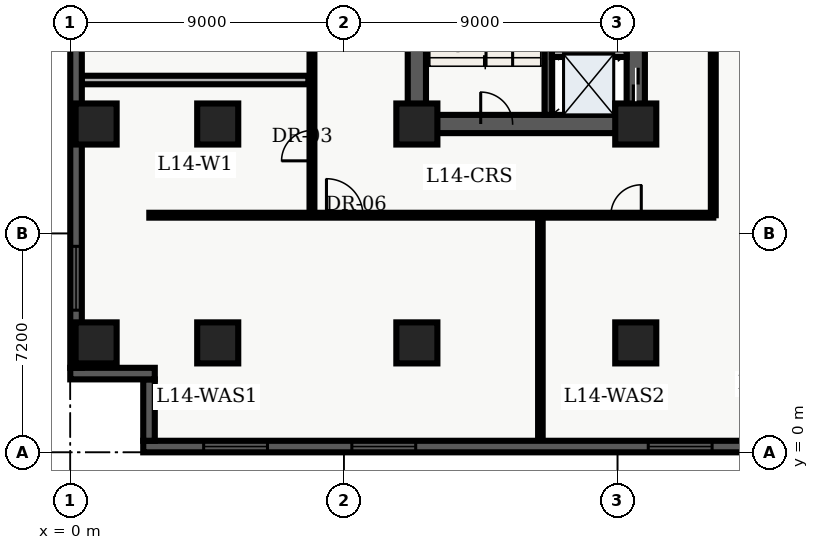
"""IFC4 building model, lengths in metres.
Left out: names, types, materials, properties, quantities, classifications, styles, units other than length and angle.
Written with IfcOpenShell. Run it as: python <this file> out.ifc"""

import sys

from ifc_helpers import new_model, entity, si_unit, converted_unit, direction, frame, origin_with_axes, origin_2d_with_axis, place, context, subcontext, project, spatial, polyline, rectangle, outline, extrude, element, fill, save


model = new_model("IFC4")
c1 = context("Model", 3, precision=1e-05, world=origin_with_axes(), true_north=direction((0.0, 1.0)))
c2 = subcontext(c1, "Body", "Model", "MODEL_VIEW")
j1 = project(units=[si_unit("LENGTHUNIT", "METRE"), converted_unit("PLANEANGLEUNIT", "DEGREE", entity("IfcPlaneAngleMeasure", 0.017), si_unit("PLANEANGLEUNIT", "RADIAN"), dimensions=[0, 0, 0, 0, 0, 0, 0])], contexts=[c1])
p1 = place(None, origin_with_axes())
s1 = spatial("IfcSite", under=j1, at=p1, CompositionType="ELEMENT")
p2 = place(p1, origin_with_axes())
s2 = spatial("IfcBuilding", under=s1, at=p2, CompositionType="ELEMENT")
p3 = place(p2, frame((0.0, 0.0, 60.0), z_axis=(0.0, 0.0, 1.0), x_axis=(1.0, 0.0, 0.0)))
s3 = spatial("IfcBuildingStorey", under=s2, at=p3, CompositionType="ELEMENT", Elevation=60.0)
p4 = place(p3, frame((11.4, 10.8, 0.0), z_axis=(0.0, 0.0, 1.0), x_axis=(0.0, 1.0, 0.0)))
e1 = element("IfcWall", 1, at=p4, inside=s3, PredefinedType="SHEAR", context=c2, shape_type="SweptSolid", body=[
    extrude(outline(polyline([(0.0, -0.3), (27.0, -0.3), (27.0, 0.3), (0.0, 0.3), (0.0, -0.3)])), origin_with_axes(), (0.0, 0.0, 1.0), 3.66),
])
p5 = place(p3, frame((11.4, 10.8, 0.0), z_axis=(0.0, 0.0, 1.0), x_axis=(1.0, 0.0, 0.0)))
e2 = element("IfcWall", 2, at=p5, inside=s3, PredefinedType="SHEAR", context=c2, shape_type="SweptSolid", body=[
    extrude(outline(polyline([(0.0, -0.3), (7.2, -0.3), (7.2, 0.3), (0.0, 0.3), (0.0, -0.3)])), origin_with_axes(), (0.0, 0.0, 1.0), 3.66),
])
p6 = place(p5, frame((2.625, 0.0, 0.0), z_axis=(0.0, 0.0, 1.0), x_axis=(1.0, 0.0, 0.0)))
e3 = element("IfcOpeningElement", 3, at=p6, cuts=e2, PredefinedType="OPENING", context=c2, shape_type="SweptSolid", body=[
    extrude(rectangle(XDim=1.05, YDim=0.62, at=origin_2d_with_axis()), origin_with_axes(), (0.0, 0.0, 1.0), 2.15),
])
p7 = place(p3, frame((18.6, 10.8, 0.0), z_axis=(0.0, 0.0, 1.0), x_axis=(0.0, 1.0, 0.0)))
e4 = element("IfcWall", 4, at=p7, inside=s3, PredefinedType="SHEAR", context=c2, shape_type="SweptSolid", body=[
    extrude(outline(polyline([(0.0, -0.3), (13.5, -0.3), (13.5, 0.3), (0.0, 0.3), (0.0, -0.3)])), origin_with_axes(), (0.0, 0.0, 1.0), 3.66),
])
p8 = place(p7, frame((1.3, 0.0, 0.0), z_axis=(0.0, 0.0, 1.0), x_axis=(1.0, 0.0, 0.0)))
e5 = element("IfcOpeningElement", 5, at=p8, cuts=e4, PredefinedType="OPENING", context=c2, shape_type="SweptSolid", body=[
    extrude(rectangle(XDim=1.1, YDim=0.62, at=origin_2d_with_axis()), origin_with_axes(), (0.0, 0.0, 1.0), 2.15),
])
p9 = place(p7, frame((3.4, 0.0, 0.0), z_axis=(0.0, 0.0, 1.0), x_axis=(1.0, 0.0, 0.0)))
e6 = element("IfcOpeningElement", 6, at=p9, cuts=e4, PredefinedType="OPENING", context=c2, shape_type="SweptSolid", body=[
    extrude(rectangle(XDim=1.1, YDim=0.62, at=origin_2d_with_axis()), origin_with_axes(), (0.0, 0.0, 1.0), 2.15),
])
p10 = place(p7, frame((11.125, 0.0, 0.0), z_axis=(0.0, 0.0, 1.0), x_axis=(1.0, 0.0, 0.0)))
e7 = element("IfcOpeningElement", 7, at=p10, cuts=e4, PredefinedType="OPENING", context=c2, shape_type="SweptSolid", body=[
    extrude(rectangle(XDim=1.05, YDim=0.62, at=origin_2d_with_axis()), origin_with_axes(), (0.0, 0.0, 1.0), 2.15),
])
p11 = place(p3, frame((15.725, 11.1, 0.0), z_axis=(0.0, 0.0, 1.0), x_axis=(0.0, 1.0, 0.0)))
e8 = element("IfcWall", 8, at=p11, inside=s3, PredefinedType="SHEAR", context=c2, shape_type="SweptSolid", body=[
    extrude(outline(polyline([(0.0, -0.125), (8.6, -0.125), (8.6, 0.125), (0.0, 0.125), (0.0, -0.125)])), origin_with_axes(), (0.0, 0.0, 1.0), 3.66),
])
for number, where, z_axis, x_axis in (
    (9, (11.4, 3.6, 0.0), (0.0, 0.0, 1.0), (1.0, 0.0, 0.0)),
    (10, (11.4, 10.8, 0.0), (0.0, 0.0, 1.0), (1.0, 0.0, 0.0)),
    (11, (18.6, 3.6, 0.0), (0.0, 0.0, 1.0), (1.0, 0.0, 0.0)),
    (12, (18.6, 10.8, 0.0), (0.0, 0.0, 1.0), (1.0, 0.0, 0.0)),
    (13, (4.85, 3.6, 0.0), (0.0, 0.0, 1.0), (1.0, 0.0, 0.0)),
    (14, (4.85, 10.8, 0.0), (0.0, 0.0, 1.0), (1.0, 0.0, 0.0)),
    (15, (0.85, 3.6, 0.0), (0.0, 0.0, 1.0), (1.0, 0.0, 0.0)),
    (16, (0.85, 10.8, 0.0), (0.0, 0.0, 1.0), (1.0, 0.0, 0.0)),
):
    element("IfcColumn", number, at=place(p3, frame(where, z_axis=z_axis, x_axis=x_axis)), inside=s3, PredefinedType="COLUMN", context=c2, shape_type="SweptSolid", body=[
        extrude(rectangle(XDim=1.35, YDim=1.35, at=origin_2d_with_axis()), origin_with_axes(), (0.0, 0.0, 1.0), 3.9),
    ])
p12 = place(p3, frame((15.84, 13.13, 0.0), z_axis=(0.0, 0.0, 1.0), x_axis=(1.0, 0.0, 0.0)))
e17 = element("IfcWall", 17, at=p12, inside=s3, PredefinedType="SOLIDWALL", context=c2, shape_type="SweptSolid", body=[
    extrude(outline(polyline([(0.0, -0.125), (2.46, -0.125), (2.46, 0.125), (0.0, 0.125), (0.0, -0.125)])), origin_with_axes(), (0.0, 0.0, 1.0), 2.7),
])
p13 = place(p3, frame((2.6, 7.8, 0.0), z_axis=(0.0, 0.0, 1.0), x_axis=(1.0, 0.0, 0.0)))
e18 = element("IfcWall", 18, at=p13, inside=s3, PredefinedType="PARTITIONING", context=c2, shape_type="SweptSolid", body=[
    extrude(outline(polyline([(0.0, -0.08), (18.55, -0.08), (18.55, 0.08), (0.0, 0.08), (0.0, -0.08)])), origin_with_axes(), (0.0, 0.0, 1.0), 2.7),
])
p14 = place(p13, frame((6.426, 0.0, 0.0), z_axis=(0.0, 0.0, 1.0), x_axis=(1.0, 0.0, 0.0)))
e19 = element("IfcOpeningElement", 19, at=p14, cuts=e18, PredefinedType="OPENING", context=c2, shape_type="SweptSolid", body=[
    extrude(rectangle(XDim=1.2, YDim=0.18, at=origin_2d_with_axis()), origin_with_axes(), (0.0, 0.0, 1.0), 2.2),
])
p15 = place(p13, frame((15.681, 0.0, 0.0), z_axis=(0.0, 0.0, 1.0), x_axis=(1.0, 0.0, 0.0)))
e20 = element("IfcOpeningElement", 20, at=p15, cuts=e18, PredefinedType="OPENING", context=c2, shape_type="SweptSolid", body=[
    extrude(rectangle(XDim=1.0, YDim=0.18, at=origin_2d_with_axis()), origin_with_axes(), (0.0, 0.0, 1.0), 2.15),
])
p16 = place(p3, frame((21.15, 7.8, 0.0), z_axis=(0.0, 0.0, 1.0), x_axis=(0.0, 1.0, 0.0)))
e21 = element("IfcWall", 21, at=p16, inside=s3, PredefinedType="PARTITIONING", context=c2, shape_type="SweptSolid", body=[
    extrude(outline(polyline([(0.0, -0.08), (32.7, -0.08), (32.7, 0.08), (0.0, 0.08), (0.0, -0.08)])), origin_with_axes(), (0.0, 0.0, 1.0), 2.7),
])
p17 = place(p16, frame((6.675, 0.0, 0.0), z_axis=(0.0, 0.0, 1.0), x_axis=(1.0, 0.0, 0.0)))
e22 = element("IfcOpeningElement", 22, at=p17, cuts=e21, PredefinedType="OPENING", context=c2, shape_type="SweptSolid", body=[
    extrude(rectangle(XDim=1.05, YDim=0.18, at=origin_2d_with_axis()), origin_with_axes(), (0.0, 0.0, 1.0), 2.15),
])
p18 = place(p3, frame((7.95, 7.8, 0.0), z_axis=(0.0, 0.0, 1.0), x_axis=(0.0, 1.0, 0.0)))
e23 = element("IfcWall", 23, at=p18, inside=s3, PredefinedType="PARTITIONING", context=c2, shape_type="SweptSolid", body=[
    extrude(outline(polyline([(0.0, -0.08), (32.7, -0.08), (32.7, 0.08), (0.0, 0.08), (0.0, -0.08)])), origin_with_axes(), (0.0, 0.0, 1.0), 2.7),
])
p19 = place(p18, frame((2.288, 0.0, 0.0), z_axis=(0.0, 0.0, 1.0), x_axis=(1.0, 0.0, 0.0)))
e24 = element("IfcOpeningElement", 24, at=p19, cuts=e23, PredefinedType="OPENING", context=c2, shape_type="SweptSolid", body=[
    extrude(rectangle(XDim=1.0, YDim=0.18, at=origin_2d_with_axis()), origin_with_axes(), (0.0, 0.0, 1.0), 2.15),
])
p20 = place(p18, frame((6.971, 0.0, 0.0), z_axis=(0.0, 0.0, 1.0), x_axis=(1.0, 0.0, 0.0)))
e25 = element("IfcOpeningElement", 25, at=p20, cuts=e23, PredefinedType="OPENING", context=c2, shape_type="SweptSolid", body=[
    extrude(rectangle(XDim=1.0, YDim=0.18, at=origin_2d_with_axis()), origin_with_axes(), (0.0, 0.0, 1.0), 2.15),
])
p21 = place(p18, frame((12.598, 0.0, 0.0), z_axis=(0.0, 0.0, 1.0), x_axis=(1.0, 0.0, 0.0)))
e26 = element("IfcOpeningElement", 26, at=p21, cuts=e23, PredefinedType="OPENING", context=c2, shape_type="SweptSolid", body=[
    extrude(rectangle(XDim=1.0, YDim=0.18, at=origin_2d_with_axis()), origin_with_axes(), (0.0, 0.0, 1.0), 2.15),
])
p22 = place(p18, frame((19.386, 0.0, 0.0), z_axis=(0.0, 0.0, 1.0), x_axis=(1.0, 0.0, 0.0)))
e27 = element("IfcOpeningElement", 27, at=p22, cuts=e23, PredefinedType="OPENING", context=c2, shape_type="SweptSolid", body=[
    extrude(rectangle(XDim=1.0, YDim=0.18, at=origin_2d_with_axis()), origin_with_axes(), (0.0, 0.0, 1.0), 2.15),
])
p23 = place(p18, frame((27.82, 0.0, 0.0), z_axis=(0.0, 0.0, 1.0), x_axis=(1.0, 0.0, 0.0)))
e28 = element("IfcOpeningElement", 28, at=p23, cuts=e23, PredefinedType="OPENING", context=c2, shape_type="SweptSolid", body=[
    extrude(rectangle(XDim=1.0, YDim=0.18, at=origin_2d_with_axis()), origin_with_axes(), (0.0, 0.0, 1.0), 2.15),
])
p24 = place(p3, frame((0.375, 12.247, 0.0), z_axis=(0.0, 0.0, 1.0), x_axis=(1.0, 0.0, 0.0)))
e29 = element("IfcWall", 29, at=p24, inside=s3, PredefinedType="PARTITIONING", context=c2, shape_type="SweptSolid", body=[
    extrude(outline(polyline([(0.0, -0.14), (7.455, -0.14), (7.455, 0.14), (0.0, 0.14), (0.0, -0.14)])), origin_with_axes(), (0.0, 0.0, 1.0), 2.7),
])
p25 = place(p3, frame((15.463, 0.36, 0.0), z_axis=(0.0, 0.0, 1.0), x_axis=(0.0, 1.0, 0.0)))
e30 = element("IfcWall", 30, at=p25, inside=s3, PredefinedType="PARTITIONING", context=c2, shape_type="SweptSolid", body=[
    extrude(outline(polyline([(0.0, -0.075), (7.34, -0.075), (7.34, 0.075), (0.0, 0.075), (0.0, -0.075)])), origin_with_axes(), (0.0, 0.0, 1.0), 2.7),
])
p26 = place(p3, frame((57.22, 0.19, 0.0), z_axis=(0.0, 0.0, 1.0), x_axis=(-1.0, 0.0, 0.0)))
e31 = element("IfcWall", 31, at=p26, inside=s3, PredefinedType="SOLIDWALL", context=c2, shape_type="SweptSolid", body=[
    extrude(outline(polyline([(0.0, -0.19), (54.82, -0.19), (54.82, 0.19), (0.0, 0.19), (0.0, -0.19)])), origin_with_axes(), (0.0, 0.0, 1.0), 3.66),
])
p27 = place(p26, frame((3.037, 0.0, 0.45), z_axis=(0.0, 0.0, 1.0), x_axis=(1.0, 0.0, 0.0)))
e32 = element("IfcOpeningElement", 32, at=p27, cuts=e31, PredefinedType="OPENING", context=c2, shape_type="SweptSolid", body=[
    extrude(rectangle(XDim=2.1, YDim=0.4, at=origin_2d_with_axis()), origin_with_axes(), (0.0, 0.0, 1.0), 2.2),
])
p28 = place(p26, frame((7.912, 0.0, 0.45), z_axis=(0.0, 0.0, 1.0), x_axis=(1.0, 0.0, 0.0)))
e33 = element("IfcOpeningElement", 33, at=p28, cuts=e31, PredefinedType="OPENING", context=c2, shape_type="SweptSolid", body=[
    extrude(rectangle(XDim=2.1, YDim=0.4, at=origin_2d_with_axis()), origin_with_axes(), (0.0, 0.0, 1.0), 2.2),
])
p29 = place(p26, frame((12.786, 0.0, 0.45), z_axis=(0.0, 0.0, 1.0), x_axis=(1.0, 0.0, 0.0)))
e34 = element("IfcOpeningElement", 34, at=p29, cuts=e31, PredefinedType="OPENING", context=c2, shape_type="SweptSolid", body=[
    extrude(rectangle(XDim=2.1, YDim=0.4, at=origin_2d_with_axis()), origin_with_axes(), (0.0, 0.0, 1.0), 2.2),
])
p30 = place(p26, frame((17.661, 0.0, 0.45), z_axis=(0.0, 0.0, 1.0), x_axis=(1.0, 0.0, 0.0)))
e35 = element("IfcOpeningElement", 35, at=p30, cuts=e31, PredefinedType="OPENING", context=c2, shape_type="SweptSolid", body=[
    extrude(rectangle(XDim=2.1, YDim=0.4, at=origin_2d_with_axis()), origin_with_axes(), (0.0, 0.0, 1.0), 2.2),
])
p31 = place(p26, frame((22.535, 0.0, 0.45), z_axis=(0.0, 0.0, 1.0), x_axis=(1.0, 0.0, 0.0)))
e36 = element("IfcOpeningElement", 36, at=p31, cuts=e31, PredefinedType="OPENING", context=c2, shape_type="SweptSolid", body=[
    extrude(rectangle(XDim=2.1, YDim=0.4, at=origin_2d_with_axis()), origin_with_axes(), (0.0, 0.0, 1.0), 2.2),
])
p32 = place(p26, frame((27.41, 0.0, 0.45), z_axis=(0.0, 0.0, 1.0), x_axis=(1.0, 0.0, 0.0)))
e37 = element("IfcOpeningElement", 37, at=p32, cuts=e31, PredefinedType="OPENING", context=c2, shape_type="SweptSolid", body=[
    extrude(rectangle(XDim=2.1, YDim=0.4, at=origin_2d_with_axis()), origin_with_axes(), (0.0, 0.0, 1.0), 2.2),
])
p33 = place(p26, frame((32.285, 0.0, 0.45), z_axis=(0.0, 0.0, 1.0), x_axis=(1.0, 0.0, 0.0)))
e38 = element("IfcOpeningElement", 38, at=p33, cuts=e31, PredefinedType="OPENING", context=c2, shape_type="SweptSolid", body=[
    extrude(rectangle(XDim=2.1, YDim=0.4, at=origin_2d_with_axis()), origin_with_axes(), (0.0, 0.0, 1.0), 2.2),
])
p34 = place(p26, frame((37.159, 0.0, 0.45), z_axis=(0.0, 0.0, 1.0), x_axis=(1.0, 0.0, 0.0)))
e39 = element("IfcOpeningElement", 39, at=p34, cuts=e31, PredefinedType="OPENING", context=c2, shape_type="SweptSolid", body=[
    extrude(rectangle(XDim=2.1, YDim=0.4, at=origin_2d_with_axis()), origin_with_axes(), (0.0, 0.0, 1.0), 2.2),
])
p35 = place(p26, frame((46.908, 0.0, 0.45), z_axis=(0.0, 0.0, 1.0), x_axis=(1.0, 0.0, 0.0)))
e40 = element("IfcOpeningElement", 40, at=p35, cuts=e31, PredefinedType="OPENING", context=c2, shape_type="SweptSolid", body=[
    extrude(rectangle(XDim=2.1, YDim=0.4, at=origin_2d_with_axis()), origin_with_axes(), (0.0, 0.0, 1.0), 2.2),
])
p36 = place(p26, frame((51.783, 0.0, 0.45), z_axis=(0.0, 0.0, 1.0), x_axis=(1.0, 0.0, 0.0)))
e41 = element("IfcOpeningElement", 41, at=p36, cuts=e31, PredefinedType="OPENING", context=c2, shape_type="SweptSolid", body=[
    extrude(rectangle(XDim=2.1, YDim=0.4, at=origin_2d_with_axis()), origin_with_axes(), (0.0, 0.0, 1.0), 2.2),
])
p37 = place(p3, frame((2.59, 0.38, 0.0), z_axis=(0.0, 0.0, 1.0), x_axis=(0.0, 1.0, 0.0)))
e42 = element("IfcWall", 42, at=p37, inside=s3, PredefinedType="SOLIDWALL", context=c2, shape_type="SweptSolid", body=[
    extrude(outline(polyline([(0.0, -0.19), (2.02, -0.19), (2.02, 0.19), (0.0, 0.19), (0.0, -0.19)])), origin_with_axes(), (0.0, 0.0, 1.0), 3.66),
])
p38 = place(p3, frame((2.78, 2.59, 0.0), z_axis=(0.0, 0.0, 1.0), x_axis=(-1.0, 0.0, 0.0)))
e43 = element("IfcWall", 43, at=p38, inside=s3, PredefinedType="SOLIDWALL", context=c2, shape_type="SweptSolid", body=[
    extrude(outline(polyline([(0.0, -0.19), (2.78, -0.19), (2.78, 0.19), (0.0, 0.19), (0.0, -0.19)])), origin_with_axes(), (0.0, 0.0, 1.0), 3.66),
])
p39 = place(p3, frame((0.19, 2.78, 0.0), z_axis=(0.0, 0.0, 1.0), x_axis=(0.0, 1.0, 0.0)))
e44 = element("IfcWall", 44, at=p39, inside=s3, PredefinedType="SOLIDWALL", context=c2, shape_type="SweptSolid", body=[
    extrude(outline(polyline([(0.0, -0.19), (43.42, -0.19), (43.42, 0.19), (0.0, 0.19), (0.0, -0.19)])), origin_with_axes(), (0.0, 0.0, 1.0), 3.66),
])
p40 = place(p39, frame((2.946, 0.0, 0.45), z_axis=(0.0, 0.0, 1.0), x_axis=(1.0, 0.0, 0.0)))
e45 = element("IfcOpeningElement", 45, at=p40, cuts=e44, PredefinedType="OPENING", context=c2, shape_type="SweptSolid", body=[
    extrude(rectangle(XDim=2.1, YDim=0.4, at=origin_2d_with_axis()), origin_with_axes(), (0.0, 0.0, 1.0), 2.2),
])
p41 = place(p39, frame((12.328, 0.0, 0.45), z_axis=(0.0, 0.0, 1.0), x_axis=(1.0, 0.0, 0.0)))
e46 = element("IfcOpeningElement", 46, at=p41, cuts=e44, PredefinedType="OPENING", context=c2, shape_type="SweptSolid", body=[
    extrude(rectangle(XDim=2.1, YDim=0.4, at=origin_2d_with_axis()), origin_with_axes(), (0.0, 0.0, 1.0), 2.2),
])
p42 = place(p39, frame((17.469, 0.0, 0.45), z_axis=(0.0, 0.0, 1.0), x_axis=(1.0, 0.0, 0.0)))
e47 = element("IfcOpeningElement", 47, at=p42, cuts=e44, PredefinedType="OPENING", context=c2, shape_type="SweptSolid", body=[
    extrude(rectangle(XDim=2.1, YDim=0.4, at=origin_2d_with_axis()), origin_with_axes(), (0.0, 0.0, 1.0), 2.2),
])
p43 = place(p39, frame((22.56, 0.0, 0.45), z_axis=(0.0, 0.0, 1.0), x_axis=(1.0, 0.0, 0.0)))
e48 = element("IfcOpeningElement", 48, at=p43, cuts=e44, PredefinedType="OPENING", context=c2, shape_type="SweptSolid", body=[
    extrude(rectangle(XDim=2.1, YDim=0.4, at=origin_2d_with_axis()), origin_with_axes(), (0.0, 0.0, 1.0), 2.2),
])
p44 = place(p39, frame((26.401, 0.0, 0.45), z_axis=(0.0, 0.0, 1.0), x_axis=(1.0, 0.0, 0.0)))
e49 = element("IfcOpeningElement", 49, at=p44, cuts=e44, PredefinedType="OPENING", context=c2, shape_type="SweptSolid", body=[
    extrude(rectangle(XDim=2.1, YDim=0.4, at=origin_2d_with_axis()), origin_with_axes(), (0.0, 0.0, 1.0), 2.2),
])
p45 = place(p39, frame((31.092, 0.0, 0.45), z_axis=(0.0, 0.0, 1.0), x_axis=(1.0, 0.0, 0.0)))
e50 = element("IfcOpeningElement", 50, at=p45, cuts=e44, PredefinedType="OPENING", context=c2, shape_type="SweptSolid", body=[
    extrude(rectangle(XDim=2.1, YDim=0.4, at=origin_2d_with_axis()), origin_with_axes(), (0.0, 0.0, 1.0), 2.2),
])
p46 = place(p39, frame((40.024, 0.0, 0.45), z_axis=(0.0, 0.0, 1.0), x_axis=(1.0, 0.0, 0.0)))
e51 = element("IfcOpeningElement", 51, at=p46, cuts=e44, PredefinedType="OPENING", context=c2, shape_type="SweptSolid", body=[
    extrude(rectangle(XDim=2.1, YDim=0.4, at=origin_2d_with_axis()), origin_with_axes(), (0.0, 0.0, 1.0), 2.2),
])
p47 = place(p7, frame((1.3, 0.0, 0.0), z_axis=(0.0, 0.0, 1.0), x_axis=(1.0, 0.0, 0.0)))
e52 = element("IfcDoor", 52, at=p47, inside=s3, OperationType="SLIDING_TO_LEFT", PredefinedType="DOOR", context=c2, shape_type="SweptSolid", body=[
    extrude(rectangle(XDim=1.1, YDim=0.09, at=origin_2d_with_axis()), origin_with_axes(), (0.0, 0.0, 1.0), 2.15),
])
fill(e5, e52)
p48 = place(p5, frame((2.625, 0.0, 0.0), z_axis=(0.0, 0.0, 1.0), x_axis=(1.0, 0.0, 0.0)))
e53 = element("IfcDoor", 53, at=p48, inside=s3, OperationType="SINGLE_SWING_LEFT", PredefinedType="DOOR", context=c2, shape_type="SweptSolid", body=[
    extrude(rectangle(XDim=1.05, YDim=0.09, at=origin_2d_with_axis()), origin_with_axes(), (0.0, 0.0, 1.0), 2.15),
])
fill(e3, e53)
p49 = place(p18, frame((2.288, 0.0, 0.0), z_axis=(0.0, 0.0, 1.0), x_axis=(1.0, 0.0, 0.0)))
e54 = element("IfcDoor", 54, at=p49, inside=s3, OperationType="SINGLE_SWING_LEFT", PredefinedType="DOOR", context=c2, shape_type="SweptSolid", body=[
    extrude(rectangle(XDim=1.0, YDim=0.09, at=origin_2d_with_axis()), origin_with_axes(), (0.0, 0.0, 1.0), 2.15),
])
fill(e24, e54)
p50 = place(p13, frame((6.426, 0.0, 0.0), z_axis=(0.0, 0.0, 1.0), x_axis=(1.0, 0.0, 0.0)))
e55 = element("IfcDoor", 55, at=p50, inside=s3, OperationType="SINGLE_SWING_LEFT", PredefinedType="DOOR", context=c2, shape_type="SweptSolid", body=[
    extrude(rectangle(XDim=1.2, YDim=0.09, at=origin_2d_with_axis()), origin_with_axes(), (0.0, 0.0, 1.0), 2.2),
])
fill(e19, e55)
p51 = place(p13, frame((15.681, 0.0, 0.0), z_axis=(0.0, 0.0, 1.0), x_axis=(1.0, 0.0, 0.0)))
e56 = element("IfcDoor", 56, at=p51, inside=s3, OperationType="SINGLE_SWING_RIGHT", PredefinedType="DOOR", context=c2, shape_type="SweptSolid", body=[
    extrude(rectangle(XDim=1.0, YDim=0.09, at=origin_2d_with_axis()), origin_with_axes(), (0.0, 0.0, 1.0), 2.15),
])
fill(e20, e56)
p52 = place(p26, frame((37.159, 0.0, 0.45), z_axis=(0.0, 0.0, 1.0), x_axis=(1.0, 0.0, 0.0)))
e57 = element("IfcWindow", 57, at=p52, inside=s3, PredefinedType="WINDOW", context=c2, shape_type="SweptSolid", body=[
    extrude(rectangle(XDim=2.1, YDim=0.09, at=origin_2d_with_axis()), origin_with_axes(), (0.0, 0.0, 1.0), 2.2),
])
fill(e39, e57)
p53 = place(p26, frame((46.908, 0.0, 0.45), z_axis=(0.0, 0.0, 1.0), x_axis=(1.0, 0.0, 0.0)))
e58 = element("IfcWindow", 58, at=p53, inside=s3, PredefinedType="WINDOW", context=c2, shape_type="SweptSolid", body=[
    extrude(rectangle(XDim=2.1, YDim=0.09, at=origin_2d_with_axis()), origin_with_axes(), (0.0, 0.0, 1.0), 2.2),
])
fill(e40, e58)
p54 = place(p26, frame((51.783, 0.0, 0.45), z_axis=(0.0, 0.0, 1.0), x_axis=(1.0, 0.0, 0.0)))
e59 = element("IfcWindow", 59, at=p54, inside=s3, PredefinedType="WINDOW", context=c2, shape_type="SweptSolid", body=[
    extrude(rectangle(XDim=2.1, YDim=0.09, at=origin_2d_with_axis()), origin_with_axes(), (0.0, 0.0, 1.0), 2.2),
])
fill(e41, e59)
p55 = place(p39, frame((2.946, 0.0, 0.45), z_axis=(0.0, 0.0, 1.0), x_axis=(1.0, 0.0, 0.0)))
e60 = element("IfcWindow", 60, at=p55, inside=s3, PredefinedType="WINDOW", context=c2, shape_type="SweptSolid", body=[
    extrude(rectangle(XDim=2.1, YDim=0.09, at=origin_2d_with_axis()), origin_with_axes(), (0.0, 0.0, 1.0), 2.2),
])
fill(e45, e60)
save(model, sys.argv[1])
